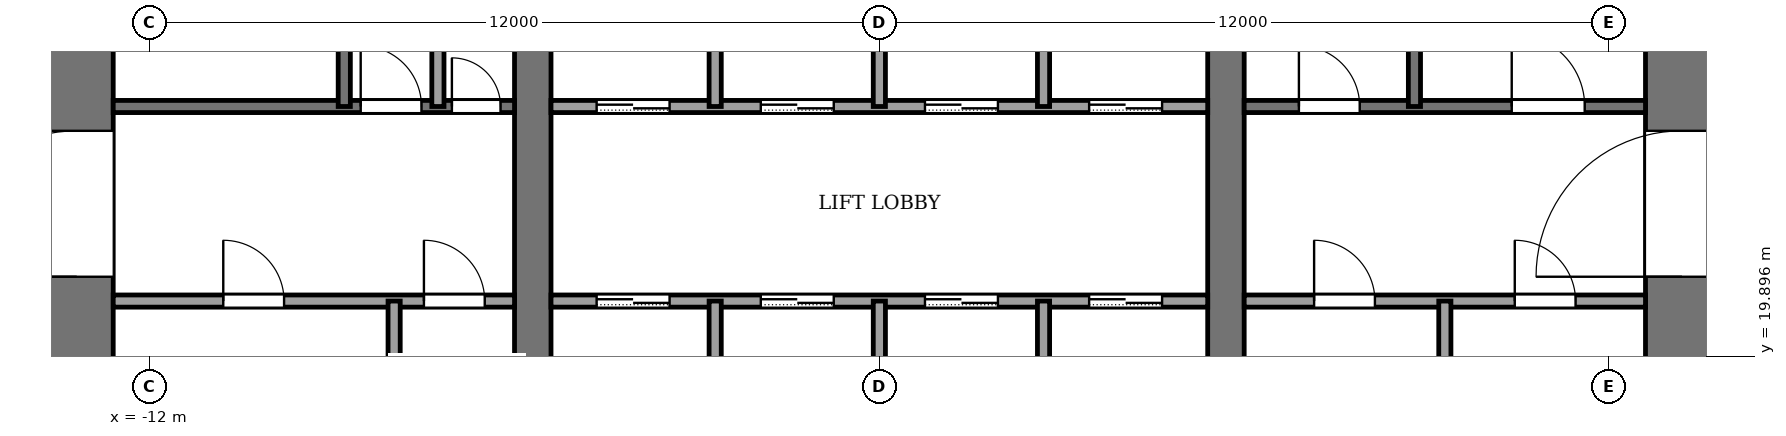
"""IFC4 building model, lengths in metres.
Left out: names, types, materials, properties, quantities, classifications, styles, units other than length and angle.
Written with IfcOpenShell. Run it as: python <this file> out.ifc"""

import sys

from ifc_helpers import new_model, si_unit, direction, frame, frame_2d, origin, place, context, subcontext, project, spatial, rectangle, extrude, element, fill, save


model = new_model("IFC4")
c1 = context("Model", 3, precision=1e-05, world=origin(), true_north=direction((0.0, 1.0)))
c2 = subcontext(c1, "Body", "Model", "MODEL_VIEW")
j1 = project(units=[si_unit("LENGTHUNIT", "METRE"), si_unit("PLANEANGLEUNIT", "RADIAN")], contexts=[c1])
p1 = place(None, origin())
s1 = spatial("IfcSite", under=j1, at=p1, CompositionType="ELEMENT")
p2 = place(p1, origin())
s2 = spatial("IfcBuilding", under=s1, at=p2, CompositionType="ELEMENT")
p3 = place(p2, frame((0.0, 0.0, 110.0)))
s3 = spatial("IfcBuildingStorey", under=s2, at=p3, CompositionType="ELEMENT", Elevation=110.0)
p4 = place(p3, frame((-13.2, 18.4, -0.13), z_axis=(0.0, 0.0, 1.0), x_axis=(0.0, 1.0, 0.0)))
e1 = element("IfcWall", 1, at=p4, inside=s3, PredefinedType="SHEAR", context=c2, shape_type="SweptSolid", body=[
    extrude(rectangle(XDim=19.2, YDim=1.2, at=frame_2d((9.6, 0.0))), origin(), (0.0, 0.0, 1.0), 3.88),
])
p5 = place(p4, frame((2.8, 0.0, 0.13)))
e2 = element("IfcOpeningElement", 2, at=p5, cuts=e1, PredefinedType="OPENING", context=c2, shape_type="SweptSolid", body=[
    extrude(rectangle(XDim=2.4, YDim=2.4, at=frame_2d((1.2, 1.2))), frame((0.0, 0.61, 0.0), z_axis=(0.0, -1.0, 0.0), x_axis=(1.0, 0.0, 0.0)), (0.0, 0.0, 1.0), 1.22),
])
p6 = place(p4, frame((13.4, 0.0, 0.13)))
e3 = element("IfcOpeningElement", 3, at=p6, cuts=e1, PredefinedType="OPENING", context=c2, shape_type="SweptSolid", body=[
    extrude(rectangle(XDim=1.4, YDim=2.2, at=frame_2d((0.7, 1.1))), frame((0.0, 0.61, 0.0), z_axis=(0.0, -1.0, 0.0), x_axis=(1.0, 0.0, 0.0)), (0.0, 0.0, 1.0), 1.22),
])
p7 = place(p3, frame((13.2, 18.4, -0.13), z_axis=(0.0, 0.0, 1.0), x_axis=(0.0, 1.0, 0.0)))
e4 = element("IfcWall", 4, at=p7, inside=s3, PredefinedType="SHEAR", context=c2, shape_type="SweptSolid", body=[
    extrude(rectangle(XDim=19.2, YDim=1.2, at=frame_2d((9.6, 0.0))), origin(), (0.0, 0.0, 1.0), 3.88),
])
p8 = place(p7, frame((2.8, 0.0, 0.13)))
e5 = element("IfcOpeningElement", 5, at=p8, cuts=e4, PredefinedType="OPENING", context=c2, shape_type="SweptSolid", body=[
    extrude(rectangle(XDim=2.4, YDim=2.4, at=frame_2d((1.2, 1.2))), frame((0.0, 0.61, 0.0), z_axis=(0.0, -1.0, 0.0), x_axis=(1.0, 0.0, 0.0)), (0.0, 0.0, 1.0), 1.22),
])
p9 = place(p7, frame((13.3, 0.0, 0.13)))
e6 = element("IfcOpeningElement", 6, at=p9, cuts=e4, PredefinedType="OPENING", context=c2, shape_type="SweptSolid", body=[
    extrude(rectangle(XDim=2.4, YDim=2.4, at=frame_2d((1.2, 1.2))), frame((0.0, 0.61, 0.0), z_axis=(0.0, -1.0, 0.0), x_axis=(1.0, 0.0, 0.0)), (0.0, 0.0, 1.0), 1.22),
])
p10 = place(p3, frame((-5.7, 18.4, -0.13), z_axis=(0.0, 0.0, 1.0), x_axis=(0.0, 1.0, 0.0)))
e7 = element("IfcWall", 7, at=p10, inside=s3, PredefinedType="SHEAR", context=c2, shape_type="SweptSolid", body=[
    extrude(rectangle(XDim=19.2, YDim=0.6, at=frame_2d((9.6, 0.0))), origin(), (0.0, 0.0, 1.0), 3.88),
])
p11 = place(p10, frame((8.35, 0.0, 0.13)))
e8 = element("IfcOpeningElement", 8, at=p11, cuts=e7, PredefinedType="OPENING", context=c2, shape_type="SweptSolid", body=[
    extrude(rectangle(XDim=0.9, YDim=2.1, at=frame_2d((0.45, 1.05))), frame((0.0, 0.31, 0.0), z_axis=(0.0, -1.0, 0.0), x_axis=(1.0, 0.0, 0.0)), (0.0, 0.0, 1.0), 0.62),
])
p12 = place(p3, frame((5.7, 18.4, -0.13), z_axis=(0.0, 0.0, 1.0), x_axis=(0.0, 1.0, 0.0)))
e9 = element("IfcWall", 9, at=p12, inside=s3, PredefinedType="SHEAR", context=c2, shape_type="SweptSolid", body=[
    extrude(rectangle(XDim=19.2, YDim=0.6, at=frame_2d((9.6, 0.0))), origin(), (0.0, 0.0, 1.0), 3.88),
])
p13 = place(p12, frame((8.35, 0.0, 0.13)))
e10 = element("IfcOpeningElement", 10, at=p13, cuts=e9, PredefinedType="OPENING", context=c2, shape_type="SweptSolid", body=[
    extrude(rectangle(XDim=0.9, YDim=2.1, at=frame_2d((0.45, 1.05))), frame((0.0, 0.31, 0.0), z_axis=(0.0, -1.0, 0.0), x_axis=(1.0, 0.0, 0.0)), (0.0, 0.0, 1.0), 0.62),
])
p14 = place(p12, frame((13.3, 0.0, 0.13)))
e11 = element("IfcOpeningElement", 11, at=p14, cuts=e9, PredefinedType="OPENING", context=c2, shape_type="SweptSolid", body=[
    extrude(rectangle(XDim=2.4, YDim=2.4, at=frame_2d((1.2, 1.2))), frame((0.0, 0.31, 0.0), z_axis=(0.0, -1.0, 0.0), x_axis=(1.0, 0.0, 0.0)), (0.0, 0.0, 1.0), 0.62),
])
p15 = place(p3, frame((-12.6, 20.8, 0.0), z_axis=(0.0, 0.0, 1.0), x_axis=(1.0, 0.0, 0.0)))
e12 = element("IfcWall", 12, at=p15, inside=s3, PredefinedType="PARTITIONING", context=c2, shape_type="SweptSolid", body=[
    extrude(rectangle(XDim=6.6, YDim=0.2, at=frame_2d((3.3, 0.0))), origin(), (0.0, 0.0, 1.0), 3.75),
])
p16 = place(p15, frame((1.81, 0.0, 0.0)))
e13 = element("IfcOpeningElement", 13, at=p16, cuts=e12, PredefinedType="OPENING", context=c2, shape_type="SweptSolid", body=[
    extrude(rectangle(XDim=1.0, YDim=2.1, at=frame_2d((0.5, 1.05))), frame((0.0, 0.11, 0.0), z_axis=(0.0, -1.0, 0.0), x_axis=(1.0, 0.0, 0.0)), (0.0, 0.0, 1.0), 0.22),
])
p17 = place(p15, frame((5.11, 0.0, 0.0)))
e14 = element("IfcOpeningElement", 14, at=p17, cuts=e12, PredefinedType="OPENING", context=c2, shape_type="SweptSolid", body=[
    extrude(rectangle(XDim=1.0, YDim=2.1, at=frame_2d((0.5, 1.05))), frame((0.0, 0.11, 0.0), z_axis=(0.0, -1.0, 0.0), x_axis=(1.0, 0.0, 0.0)), (0.0, 0.0, 1.0), 0.22),
])
p18 = place(p3, frame((-5.4, 20.8, 0.0), z_axis=(0.0, 0.0, 1.0), x_axis=(1.0, 0.0, 0.0)))
e15 = element("IfcWall", 15, at=p18, inside=s3, PredefinedType="PARTITIONING", context=c2, shape_type="SweptSolid", body=[
    extrude(rectangle(XDim=10.8, YDim=0.2, at=frame_2d((5.4, 0.0))), origin(), (0.0, 0.0, 1.0), 3.75),
])
p19 = place(p18, frame((0.75, 0.0, 0.0)))
e16 = element("IfcOpeningElement", 16, at=p19, cuts=e15, PredefinedType="OPENING", context=c2, shape_type="SweptSolid", body=[
    extrude(rectangle(XDim=1.2, YDim=2.2, at=frame_2d((0.6, 1.1))), frame((0.0, 0.11, 0.0), z_axis=(0.0, -1.0, 0.0), x_axis=(1.0, 0.0, 0.0)), (0.0, 0.0, 1.0), 0.22),
])
p20 = place(p18, frame((3.45, 0.0, 0.0)))
e17 = element("IfcOpeningElement", 17, at=p20, cuts=e15, PredefinedType="OPENING", context=c2, shape_type="SweptSolid", body=[
    extrude(rectangle(XDim=1.2, YDim=2.2, at=frame_2d((0.6, 1.1))), frame((0.0, 0.11, 0.0), z_axis=(0.0, -1.0, 0.0), x_axis=(1.0, 0.0, 0.0)), (0.0, 0.0, 1.0), 0.22),
])
p21 = place(p18, frame((6.15, 0.0, 0.0)))
e18 = element("IfcOpeningElement", 18, at=p21, cuts=e15, PredefinedType="OPENING", context=c2, shape_type="SweptSolid", body=[
    extrude(rectangle(XDim=1.2, YDim=2.2, at=frame_2d((0.6, 1.1))), frame((0.0, 0.11, 0.0), z_axis=(0.0, -1.0, 0.0), x_axis=(1.0, 0.0, 0.0)), (0.0, 0.0, 1.0), 0.22),
])
p22 = place(p18, frame((8.85, 0.0, 0.0)))
e19 = element("IfcOpeningElement", 19, at=p22, cuts=e15, PredefinedType="OPENING", context=c2, shape_type="SweptSolid", body=[
    extrude(rectangle(XDim=1.2, YDim=2.2, at=frame_2d((0.6, 1.1))), frame((0.0, 0.11, 0.0), z_axis=(0.0, -1.0, 0.0), x_axis=(1.0, 0.0, 0.0)), (0.0, 0.0, 1.0), 0.22),
])
p23 = place(p3, frame((6.0, 20.8, 0.0), z_axis=(0.0, 0.0, 1.0), x_axis=(1.0, 0.0, 0.0)))
e20 = element("IfcWall", 20, at=p23, inside=s3, PredefinedType="PARTITIONING", context=c2, shape_type="SweptSolid", body=[
    extrude(rectangle(XDim=6.6, YDim=0.2, at=frame_2d((3.3, 0.0))), origin(), (0.0, 0.0, 1.0), 3.75),
])
p24 = place(p23, frame((1.15, 0.0, 0.0)))
e21 = element("IfcOpeningElement", 21, at=p24, cuts=e20, PredefinedType="OPENING", context=c2, shape_type="SweptSolid", body=[
    extrude(rectangle(XDim=1.0, YDim=2.1, at=frame_2d((0.5, 1.05))), frame((0.0, 0.11, 0.0), z_axis=(0.0, -1.0, 0.0), x_axis=(1.0, 0.0, 0.0)), (0.0, 0.0, 1.0), 0.22),
])
p25 = place(p23, frame((4.45, 0.0, 0.0)))
e22 = element("IfcOpeningElement", 22, at=p25, cuts=e20, PredefinedType="OPENING", context=c2, shape_type="SweptSolid", body=[
    extrude(rectangle(XDim=1.0, YDim=2.1, at=frame_2d((0.5, 1.05))), frame((0.0, 0.11, 0.0), z_axis=(0.0, -1.0, 0.0), x_axis=(1.0, 0.0, 0.0)), (0.0, 0.0, 1.0), 0.22),
])
p26 = place(p3, frame((-12.6, 24.0, 0.0), z_axis=(0.0, 0.0, 1.0), x_axis=(1.0, 0.0, 0.0)))
e23 = element("IfcWall", 23, at=p26, inside=s3, PredefinedType="PARTITIONING", context=c2, shape_type="SweptSolid", body=[
    extrude(rectangle(XDim=6.6, YDim=0.2, at=frame_2d((3.3, 0.0))), origin(), (0.0, 0.0, 1.0), 3.75),
])
p27 = place(p26, frame((4.07, 0.0, 0.0)))
e24 = element("IfcOpeningElement", 24, at=p27, cuts=e23, PredefinedType="OPENING", context=c2, shape_type="SweptSolid", body=[
    extrude(rectangle(XDim=1.0, YDim=2.1, at=frame_2d((0.5, 1.05))), frame((0.0, 0.11, 0.0), z_axis=(0.0, -1.0, 0.0), x_axis=(1.0, 0.0, 0.0)), (0.0, 0.0, 1.0), 0.22),
])
p28 = place(p26, frame((5.57, 0.0, 0.0)))
e25 = element("IfcOpeningElement", 25, at=p28, cuts=e23, PredefinedType="OPENING", context=c2, shape_type="SweptSolid", body=[
    extrude(rectangle(XDim=0.8, YDim=2.1, at=frame_2d((0.4, 1.05))), frame((0.0, 0.11, 0.0), z_axis=(0.0, -1.0, 0.0), x_axis=(1.0, 0.0, 0.0)), (0.0, 0.0, 1.0), 0.22),
])
p29 = place(p3, frame((-5.4, 24.0, 0.0), z_axis=(0.0, 0.0, 1.0), x_axis=(1.0, 0.0, 0.0)))
e26 = element("IfcWall", 26, at=p29, inside=s3, PredefinedType="PARTITIONING", context=c2, shape_type="SweptSolid", body=[
    extrude(rectangle(XDim=10.8, YDim=0.2, at=frame_2d((5.4, 0.0))), origin(), (0.0, 0.0, 1.0), 3.75),
])
p30 = place(p29, frame((0.75, 0.0, 0.0)))
e27 = element("IfcOpeningElement", 27, at=p30, cuts=e26, PredefinedType="OPENING", context=c2, shape_type="SweptSolid", body=[
    extrude(rectangle(XDim=1.2, YDim=2.2, at=frame_2d((0.6, 1.1))), frame((0.0, 0.11, 0.0), z_axis=(0.0, -1.0, 0.0), x_axis=(1.0, 0.0, 0.0)), (0.0, 0.0, 1.0), 0.22),
])
p31 = place(p29, frame((3.45, 0.0, 0.0)))
e28 = element("IfcOpeningElement", 28, at=p31, cuts=e26, PredefinedType="OPENING", context=c2, shape_type="SweptSolid", body=[
    extrude(rectangle(XDim=1.2, YDim=2.2, at=frame_2d((0.6, 1.1))), frame((0.0, 0.11, 0.0), z_axis=(0.0, -1.0, 0.0), x_axis=(1.0, 0.0, 0.0)), (0.0, 0.0, 1.0), 0.22),
])
p32 = place(p29, frame((6.15, 0.0, 0.0)))
e29 = element("IfcOpeningElement", 29, at=p32, cuts=e26, PredefinedType="OPENING", context=c2, shape_type="SweptSolid", body=[
    extrude(rectangle(XDim=1.2, YDim=2.2, at=frame_2d((0.6, 1.1))), frame((0.0, 0.11, 0.0), z_axis=(0.0, -1.0, 0.0), x_axis=(1.0, 0.0, 0.0)), (0.0, 0.0, 1.0), 0.22),
])
p33 = place(p29, frame((8.85, 0.0, 0.0)))
e30 = element("IfcOpeningElement", 30, at=p33, cuts=e26, PredefinedType="OPENING", context=c2, shape_type="SweptSolid", body=[
    extrude(rectangle(XDim=1.2, YDim=2.2, at=frame_2d((0.6, 1.1))), frame((0.0, 0.11, 0.0), z_axis=(0.0, -1.0, 0.0), x_axis=(1.0, 0.0, 0.0)), (0.0, 0.0, 1.0), 0.22),
])
p34 = place(p3, frame((6.0, 24.0, 0.0), z_axis=(0.0, 0.0, 1.0), x_axis=(1.0, 0.0, 0.0)))
e31 = element("IfcWall", 31, at=p34, inside=s3, PredefinedType="PARTITIONING", context=c2, shape_type="SweptSolid", body=[
    extrude(rectangle(XDim=6.6, YDim=0.2, at=frame_2d((3.3, 0.0))), origin(), (0.0, 0.0, 1.0), 3.75),
])
p35 = place(p34, frame((0.9, 0.0, 0.0)))
e32 = element("IfcOpeningElement", 32, at=p35, cuts=e31, PredefinedType="OPENING", context=c2, shape_type="SweptSolid", body=[
    extrude(rectangle(XDim=1.0, YDim=2.1, at=frame_2d((0.5, 1.05))), frame((0.0, 0.11, 0.0), z_axis=(0.0, -1.0, 0.0), x_axis=(1.0, 0.0, 0.0)), (0.0, 0.0, 1.0), 0.22),
])
p36 = place(p34, frame((4.4, 0.0, 0.0)))
e33 = element("IfcOpeningElement", 33, at=p36, cuts=e31, PredefinedType="OPENING", context=c2, shape_type="SweptSolid", body=[
    extrude(rectangle(XDim=1.2, YDim=2.2, at=frame_2d((0.6, 1.1))), frame((0.0, 0.11, 0.0), z_axis=(0.0, -1.0, 0.0), x_axis=(1.0, 0.0, 0.0)), (0.0, 0.0, 1.0), 0.22),
])
p37 = place(p3, frame((-8.8, 24.0, 0.0), z_axis=(0.0, 0.0, 1.0), x_axis=(0.0, 1.0, 0.0)))
e34 = element("IfcWall", 34, at=p37, inside=s3, PredefinedType="PARTITIONING", context=c2, shape_type="SweptSolid", body=[
    extrude(rectangle(XDim=7.4, YDim=0.2, at=frame_2d((3.7, 0.0))), origin(), (0.0, 0.0, 1.0), 3.75),
])
p38 = place(p3, frame((-7.98, 18.4, 0.0), z_axis=(0.0, 0.0, 1.0), x_axis=(0.0, 1.0, 0.0)))
e35 = element("IfcWall", 35, at=p38, inside=s3, PredefinedType="PARTITIONING", context=c2, shape_type="SweptSolid", body=[
    extrude(rectangle(XDim=2.4, YDim=0.2, at=frame_2d((1.2, 0.0))), origin(), (0.0, 0.0, 1.0), 3.75),
])
p39 = place(p3, frame((-7.26, 24.0, 0.0), z_axis=(0.0, 0.0, 1.0), x_axis=(0.0, 1.0, 0.0)))
e36 = element("IfcWall", 36, at=p39, inside=s3, PredefinedType="PARTITIONING", context=c2, shape_type="SweptSolid", body=[
    extrude(rectangle(XDim=7.4, YDim=0.2, at=frame_2d((3.7, 0.0))), origin(), (0.0, 0.0, 1.0), 3.75),
])
p40 = place(p3, frame((-2.7, 18.4, 0.0), z_axis=(0.0, 0.0, 1.0), x_axis=(0.0, 1.0, 0.0)))
e37 = element("IfcWall", 37, at=p40, inside=s3, PredefinedType="PARTITIONING", context=c2, shape_type="SweptSolid", body=[
    extrude(rectangle(XDim=2.4, YDim=0.2, at=frame_2d((1.2, 0.0))), origin(), (0.0, 0.0, 1.0), 3.75),
])
p41 = place(p3, frame((-2.7, 24.0, 0.0), z_axis=(0.0, 0.0, 1.0), x_axis=(0.0, 1.0, 0.0)))
e38 = element("IfcWall", 38, at=p41, inside=s3, PredefinedType="PARTITIONING", context=c2, shape_type="SweptSolid", body=[
    extrude(rectangle(XDim=2.4, YDim=0.2, at=frame_2d((1.2, 0.0))), origin(), (0.0, 0.0, 1.0), 3.75),
])
p42 = place(p3, frame((0.0, 18.4, 0.0), z_axis=(0.0, 0.0, 1.0), x_axis=(0.0, 1.0, 0.0)))
e39 = element("IfcWall", 39, at=p42, inside=s3, PredefinedType="PARTITIONING", context=c2, shape_type="SweptSolid", body=[
    extrude(rectangle(XDim=2.4, YDim=0.2, at=frame_2d((1.2, 0.0))), origin(), (0.0, 0.0, 1.0), 3.75),
])
p43 = place(p3, frame((0.0, 24.0, 0.0), z_axis=(0.0, 0.0, 1.0), x_axis=(0.0, 1.0, 0.0)))
e40 = element("IfcWall", 40, at=p43, inside=s3, PredefinedType="PARTITIONING", context=c2, shape_type="SweptSolid", body=[
    extrude(rectangle(XDim=6.4, YDim=0.2, at=frame_2d((3.2, 0.0))), origin(), (0.0, 0.0, 1.0), 3.75),
])
p44 = place(p3, frame((2.7, 18.4, 0.0), z_axis=(0.0, 0.0, 1.0), x_axis=(0.0, 1.0, 0.0)))
e41 = element("IfcWall", 41, at=p44, inside=s3, PredefinedType="PARTITIONING", context=c2, shape_type="SweptSolid", body=[
    extrude(rectangle(XDim=2.4, YDim=0.2, at=frame_2d((1.2, 0.0))), origin(), (0.0, 0.0, 1.0), 3.75),
])
p45 = place(p3, frame((2.7, 24.0, 0.0), z_axis=(0.0, 0.0, 1.0), x_axis=(0.0, 1.0, 0.0)))
e42 = element("IfcWall", 42, at=p45, inside=s3, PredefinedType="PARTITIONING", context=c2, shape_type="SweptSolid", body=[
    extrude(rectangle(XDim=2.4, YDim=0.2, at=frame_2d((1.2, 0.0))), origin(), (0.0, 0.0, 1.0), 3.75),
])
p46 = place(p3, frame((8.8, 24.0, 0.0), z_axis=(0.0, 0.0, 1.0), x_axis=(0.0, 1.0, 0.0)))
e43 = element("IfcWall", 43, at=p46, inside=s3, PredefinedType="PARTITIONING", context=c2, shape_type="SweptSolid", body=[
    extrude(rectangle(XDim=7.4, YDim=0.2, at=frame_2d((3.7, 0.0))), origin(), (0.0, 0.0, 1.0), 3.75),
])
p47 = place(p3, frame((9.3, 18.4, 0.0), z_axis=(0.0, 0.0, 1.0), x_axis=(0.0, 1.0, 0.0)))
e44 = element("IfcWall", 44, at=p47, inside=s3, PredefinedType="PARTITIONING", context=c2, shape_type="SweptSolid", body=[
    extrude(rectangle(XDim=2.4, YDim=0.2, at=frame_2d((1.2, 0.0))), origin(), (0.0, 0.0, 1.0), 3.75),
])
p48 = place(p19, origin())
e45 = element("IfcDoor", 45, at=p48, inside=s3, OperationType="SLIDING_TO_LEFT", PredefinedType="DOOR", context=c2, shape_type="SweptSolid", body=[
    extrude(rectangle(XDim=1.2, YDim=2.2, at=frame_2d((0.6, 1.1))), frame((0.0, 0.025, 0.0), z_axis=(0.0, -1.0, 0.0), x_axis=(1.0, 0.0, 0.0)), (0.0, 0.0, 1.0), 0.05),
])
fill(e16, e45)
p49 = place(p20, origin())
e46 = element("IfcDoor", 46, at=p49, inside=s3, OperationType="SLIDING_TO_LEFT", PredefinedType="DOOR", context=c2, shape_type="SweptSolid", body=[
    extrude(rectangle(XDim=1.2, YDim=2.2, at=frame_2d((0.6, 1.1))), frame((0.0, 0.025, 0.0), z_axis=(0.0, -1.0, 0.0), x_axis=(1.0, 0.0, 0.0)), (0.0, 0.0, 1.0), 0.05),
])
fill(e17, e46)
p50 = place(p21, origin())
e47 = element("IfcDoor", 47, at=p50, inside=s3, OperationType="SLIDING_TO_LEFT", PredefinedType="DOOR", context=c2, shape_type="SweptSolid", body=[
    extrude(rectangle(XDim=1.2, YDim=2.2, at=frame_2d((0.6, 1.1))), frame((0.0, 0.025, 0.0), z_axis=(0.0, -1.0, 0.0), x_axis=(1.0, 0.0, 0.0)), (0.0, 0.0, 1.0), 0.05),
])
fill(e18, e47)
p51 = place(p22, origin())
e48 = element("IfcDoor", 48, at=p51, inside=s3, OperationType="SLIDING_TO_LEFT", PredefinedType="DOOR", context=c2, shape_type="SweptSolid", body=[
    extrude(rectangle(XDim=1.2, YDim=2.2, at=frame_2d((0.6, 1.1))), frame((0.0, 0.025, 0.0), z_axis=(0.0, -1.0, 0.0), x_axis=(1.0, 0.0, 0.0)), (0.0, 0.0, 1.0), 0.05),
])
fill(e19, e48)
p52 = place(p30, origin())
e49 = element("IfcDoor", 49, at=p52, inside=s3, OperationType="SLIDING_TO_LEFT", PredefinedType="DOOR", context=c2, shape_type="SweptSolid", body=[
    extrude(rectangle(XDim=1.2, YDim=2.2, at=frame_2d((0.6, 1.1))), frame((0.0, 0.025, 0.0), z_axis=(0.0, -1.0, 0.0), x_axis=(1.0, 0.0, 0.0)), (0.0, 0.0, 1.0), 0.05),
])
fill(e27, e49)
p53 = place(p31, origin())
e50 = element("IfcDoor", 50, at=p53, inside=s3, OperationType="SLIDING_TO_LEFT", PredefinedType="DOOR", context=c2, shape_type="SweptSolid", body=[
    extrude(rectangle(XDim=1.2, YDim=2.2, at=frame_2d((0.6, 1.1))), frame((0.0, 0.025, 0.0), z_axis=(0.0, -1.0, 0.0), x_axis=(1.0, 0.0, 0.0)), (0.0, 0.0, 1.0), 0.05),
])
fill(e28, e50)
p54 = place(p32, origin())
e51 = element("IfcDoor", 51, at=p54, inside=s3, OperationType="SLIDING_TO_LEFT", PredefinedType="DOOR", context=c2, shape_type="SweptSolid", body=[
    extrude(rectangle(XDim=1.2, YDim=2.2, at=frame_2d((0.6, 1.1))), frame((0.0, 0.025, 0.0), z_axis=(0.0, -1.0, 0.0), x_axis=(1.0, 0.0, 0.0)), (0.0, 0.0, 1.0), 0.05),
])
fill(e29, e51)
p55 = place(p33, origin())
e52 = element("IfcDoor", 52, at=p55, inside=s3, OperationType="SLIDING_TO_LEFT", PredefinedType="DOOR", context=c2, shape_type="SweptSolid", body=[
    extrude(rectangle(XDim=1.2, YDim=2.2, at=frame_2d((0.6, 1.1))), frame((0.0, 0.025, 0.0), z_axis=(0.0, -1.0, 0.0), x_axis=(1.0, 0.0, 0.0)), (0.0, 0.0, 1.0), 0.05),
])
fill(e30, e52)
p56 = place(p16, origin())
e53 = element("IfcDoor", 53, at=p56, inside=s3, OperationType="SINGLE_SWING_LEFT", PredefinedType="DOOR", context=c2, shape_type="SweptSolid", body=[
    extrude(rectangle(XDim=1.0, YDim=2.1, at=frame_2d((0.5, 1.05))), frame((0.0, 0.025, 0.0), z_axis=(0.0, -1.0, 0.0), x_axis=(1.0, 0.0, 0.0)), (0.0, 0.0, 1.0), 0.05),
])
fill(e13, e53)
p57 = place(p17, origin())
e54 = element("IfcDoor", 54, at=p57, inside=s3, OperationType="SINGLE_SWING_LEFT", PredefinedType="DOOR", context=c2, shape_type="SweptSolid", body=[
    extrude(rectangle(XDim=1.0, YDim=2.1, at=frame_2d((0.5, 1.05))), frame((0.0, 0.025, 0.0), z_axis=(0.0, -1.0, 0.0), x_axis=(1.0, 0.0, 0.0)), (0.0, 0.0, 1.0), 0.05),
])
fill(e14, e54)
p58 = place(p24, origin())
e55 = element("IfcDoor", 55, at=p58, inside=s3, OperationType="SINGLE_SWING_LEFT", PredefinedType="DOOR", context=c2, shape_type="SweptSolid", body=[
    extrude(rectangle(XDim=1.0, YDim=2.1, at=frame_2d((0.5, 1.05))), frame((0.0, 0.025, 0.0), z_axis=(0.0, -1.0, 0.0), x_axis=(1.0, 0.0, 0.0)), (0.0, 0.0, 1.0), 0.05),
])
fill(e21, e55)
p59 = place(p25, origin())
e56 = element("IfcDoor", 56, at=p59, inside=s3, OperationType="SINGLE_SWING_LEFT", PredefinedType="DOOR", context=c2, shape_type="SweptSolid", body=[
    extrude(rectangle(XDim=1.0, YDim=2.1, at=frame_2d((0.5, 1.05))), frame((0.0, 0.025, 0.0), z_axis=(0.0, -1.0, 0.0), x_axis=(1.0, 0.0, 0.0)), (0.0, 0.0, 1.0), 0.05),
])
fill(e22, e56)
p60 = place(p27, origin())
e57 = element("IfcDoor", 57, at=p60, inside=s3, OperationType="SINGLE_SWING_RIGHT", PredefinedType="DOOR", context=c2, shape_type="SweptSolid", body=[
    extrude(rectangle(XDim=1.0, YDim=2.1, at=frame_2d((0.5, 1.05))), frame((0.0, 0.025, 0.0), z_axis=(0.0, -1.0, 0.0), x_axis=(1.0, 0.0, 0.0)), (0.0, 0.0, 1.0), 0.05),
])
fill(e24, e57)
p61 = place(p28, origin())
e58 = element("IfcDoor", 58, at=p61, inside=s3, OperationType="SINGLE_SWING_LEFT", PredefinedType="DOOR", context=c2, shape_type="SweptSolid", body=[
    extrude(rectangle(XDim=0.8, YDim=2.1, at=frame_2d((0.4, 1.05))), frame((0.0, 0.025, 0.0), z_axis=(0.0, -1.0, 0.0), x_axis=(1.0, 0.0, 0.0)), (0.0, 0.0, 1.0), 0.05),
])
fill(e25, e58)
p62 = place(p35, origin())
e59 = element("IfcDoor", 59, at=p62, inside=s3, OperationType="SINGLE_SWING_RIGHT", PredefinedType="DOOR", context=c2, shape_type="SweptSolid", body=[
    extrude(rectangle(XDim=1.0, YDim=2.1, at=frame_2d((0.5, 1.05))), frame((0.0, 0.025, 0.0), z_axis=(0.0, -1.0, 0.0), x_axis=(1.0, 0.0, 0.0)), (0.0, 0.0, 1.0), 0.05),
])
fill(e32, e59)
p63 = place(p36, origin())
e60 = element("IfcDoor", 60, at=p63, inside=s3, OperationType="SINGLE_SWING_LEFT", PredefinedType="DOOR", context=c2, shape_type="SweptSolid", body=[
    extrude(rectangle(XDim=1.2, YDim=2.2, at=frame_2d((0.6, 1.1))), frame((0.0, 0.025, 0.0), z_axis=(0.0, -1.0, 0.0), x_axis=(1.0, 0.0, 0.0)), (0.0, 0.0, 1.0), 0.05),
])
fill(e33, e60)
p64 = place(p5, origin())
e61 = element("IfcDoor", 61, at=p64, inside=s3, OperationType="DOUBLE_DOOR_SINGLE_SWING", PredefinedType="DOOR", context=c2, shape_type="SweptSolid", body=[
    extrude(rectangle(XDim=2.4, YDim=2.4, at=frame_2d((1.2, 1.2))), frame((0.0, 0.025, 0.0), z_axis=(0.0, -1.0, 0.0), x_axis=(1.0, 0.0, 0.0)), (0.0, 0.0, 1.0), 0.05),
])
fill(e2, e61)
p65 = place(p8, origin())
e62 = element("IfcDoor", 62, at=p65, inside=s3, OperationType="DOUBLE_DOOR_SINGLE_SWING", PredefinedType="DOOR", context=c2, shape_type="SweptSolid", body=[
    extrude(rectangle(XDim=2.4, YDim=2.4, at=frame_2d((1.2, 1.2))), frame((0.0, 0.025, 0.0), z_axis=(0.0, -1.0, 0.0), x_axis=(1.0, 0.0, 0.0)), (0.0, 0.0, 1.0), 0.05),
])
fill(e5, e62)
save(model, sys.argv[1])
